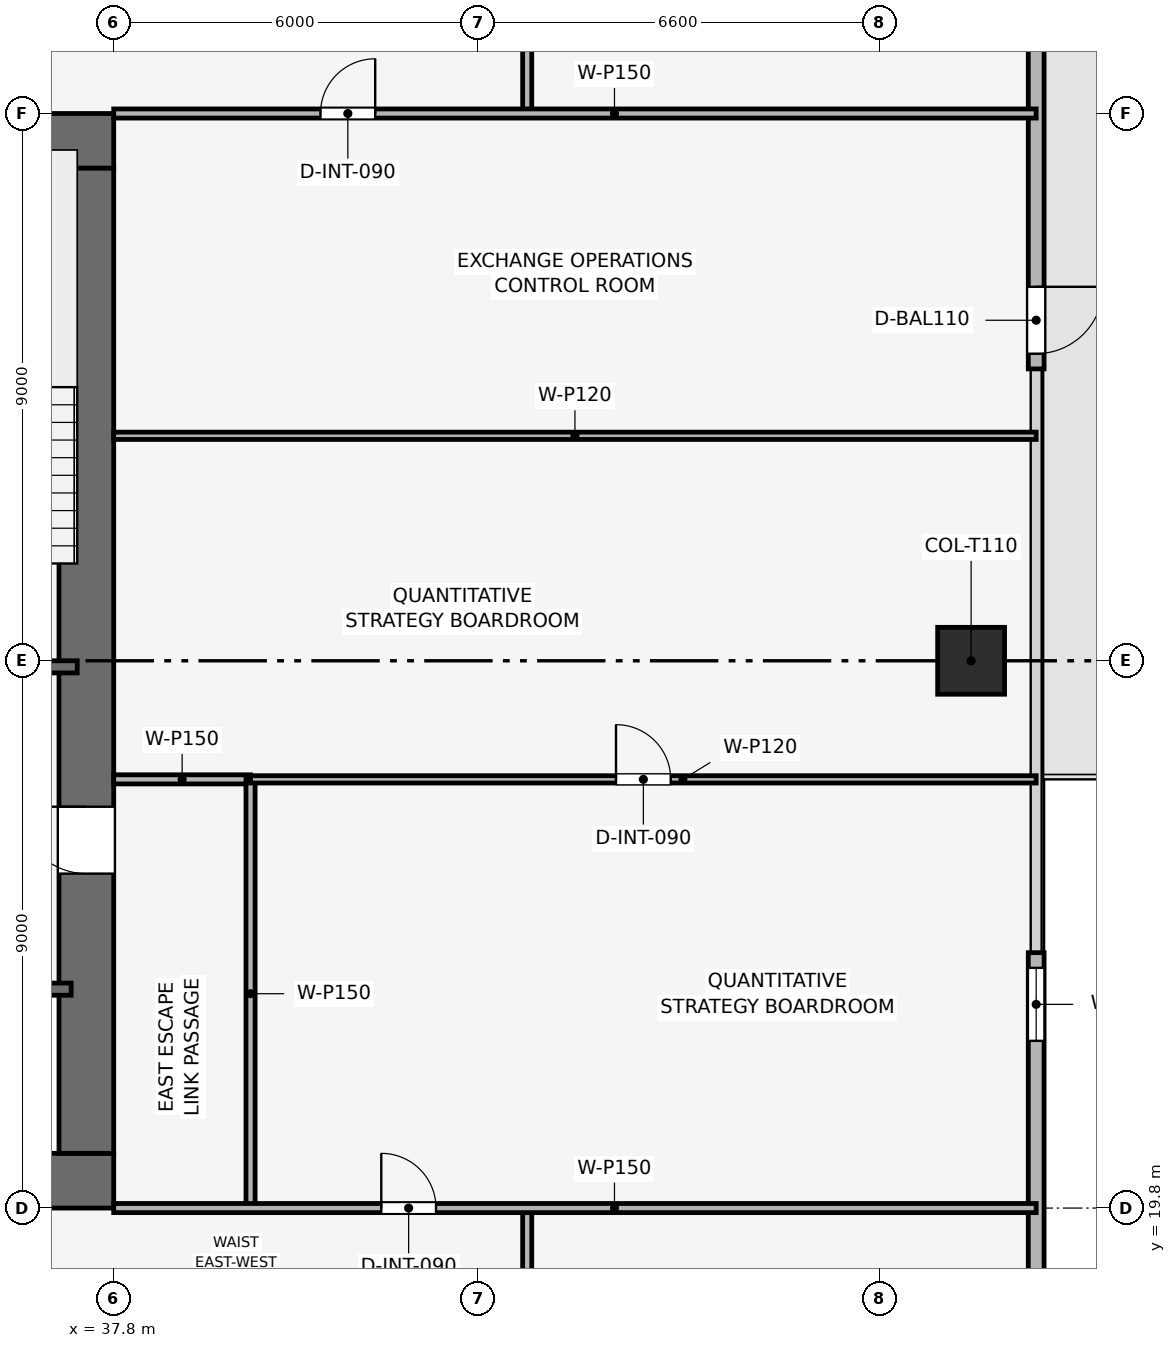
"""IFC4 building model, lengths in metres.
Left out: names, types, materials, properties, quantities, classifications, styles, units other than length and angle.
Written with IfcOpenShell. Run it as: python <this file> out.ifc"""

import sys

from ifc_helpers import new_model, si_unit, direction, frame, frame_2d, origin, origin_2d, place, context, subcontext, project, spatial, rectangle, extrude, element, fill, save


model = new_model("IFC4")
c1 = context("Model", 3, precision=1e-05, world=origin(), true_north=direction((0.0, 1.0)))
c2 = subcontext(c1, "Body", "Model", "MODEL_VIEW")
j1 = project(units=[si_unit("LENGTHUNIT", "METRE"), si_unit("PLANEANGLEUNIT", "RADIAN")], contexts=[c1])
p1 = place(None, origin())
s1 = spatial("IfcSite", under=j1, at=p1, CompositionType="ELEMENT")
p2 = place(p1, origin())
s2 = spatial("IfcBuilding", under=s1, at=p2, CompositionType="ELEMENT")
p3 = place(p2, frame((0.0, 0.0, 179.55)))
s3 = spatial("IfcBuildingStorey", under=s2, at=p3, CompositionType="ELEMENT", Elevation=179.55)
p4 = place(p3, frame((19.8, 20.25, 0.0), z_axis=(0.0, 0.0, 1.0), x_axis=(1.0, 0.0, 0.0)))
e1 = element("IfcWall", 1, at=p4, inside=s3, PredefinedType="SHEAR", context=c2, shape_type="SweptSolid", body=[
    extrude(rectangle(XDim=18.0, YDim=0.9, at=frame_2d((9.0, 0.0))), origin(), (0.0, 0.0, 1.0), 3.75),
])
p5 = place(p4, frame((8.4, 0.0, 0.0)))
e2 = element("IfcOpeningElement", 2, at=p5, cuts=e1, PredefinedType="OPENING", context=c2, shape_type="SweptSolid", body=[
    extrude(rectangle(XDim=1.2, YDim=2.2, at=frame_2d((0.6, 1.1))), frame((0.0, 0.46, 0.0), z_axis=(0.0, -1.0, 0.0), x_axis=(1.0, 0.0, 0.0)), (0.0, 0.0, 1.0), 0.92),
])
p6 = place(p3, frame((19.8, 37.35, 0.0), z_axis=(0.0, 0.0, 1.0), x_axis=(1.0, 0.0, 0.0)))
e3 = element("IfcWall", 3, at=p6, inside=s3, PredefinedType="SHEAR", context=c2, shape_type="SweptSolid", body=[
    extrude(rectangle(XDim=18.0, YDim=0.9, at=frame_2d((9.0, 0.0))), origin(), (0.0, 0.0, 1.0), 3.75),
])
p7 = place(p6, frame((7.05, 0.0, 0.0)))
e4 = element("IfcOpeningElement", 4, at=p7, cuts=e3, PredefinedType="OPENING", context=c2, shape_type="SweptSolid", body=[
    extrude(rectangle(XDim=1.1, YDim=2.15, at=frame_2d((0.55, 1.075))), frame((0.0, 0.46, 0.0), z_axis=(0.0, -1.0, 0.0), x_axis=(1.0, 0.0, 0.0)), (0.0, 0.0, 1.0), 0.92),
])
p8 = place(p3, frame((37.35, 20.7, 0.0), z_axis=(0.0, 0.0, 1.0), x_axis=(0.0, 1.0, 0.0)))
e5 = element("IfcWall", 5, at=p8, inside=s3, PredefinedType="SHEAR", context=c2, shape_type="SweptSolid", body=[
    extrude(rectangle(XDim=16.2, YDim=0.9, at=frame_2d((8.1, 0.0))), origin(), (0.0, 0.0, 1.0), 3.75),
])
p9 = place(p8, frame((4.6, 0.0, 0.0)))
e6 = element("IfcOpeningElement", 6, at=p9, cuts=e5, PredefinedType="OPENING", context=c2, shape_type="SweptSolid", body=[
    extrude(rectangle(XDim=1.1, YDim=2.15, at=frame_2d((0.55, 1.075))), frame((0.0, 0.46, 0.0), z_axis=(0.0, -1.0, 0.0), x_axis=(1.0, 0.0, 0.0)), (0.0, 0.0, 1.0), 0.92),
])
p10 = place(p3, frame((51.9, 28.8, 0.003), z_axis=(0.0, 0.0, 1.0), x_axis=(1.0, 0.0, 0.0)))
e7 = element("IfcColumn", 7, at=p10, inside=s3, PredefinedType="COLUMN", context=c2, shape_type="SweptSolid", body=[
    extrude(rectangle(XDim=1.1, YDim=1.1, at=origin_2d()), origin(), (0.0, 0.0, 1.0), 3.489),
])
p11 = place(p3, frame((52.97, 46.2, 0.0), z_axis=(0.0, 0.0, 1.0), x_axis=(0.0, -1.0, 0.0)))
e8 = element("IfcWall", 8, at=p11, inside=s3, PredefinedType="SOLIDWALL", context=c2, shape_type="SweptSolid", body=[
    extrude(rectangle(XDim=12.6, YDim=0.26, at=frame_2d((6.3, 0.0))), origin(), (0.0, 0.0, 1.0), 3.495),
])
p12 = place(p11, frame((11.25, 0.0, 0.0)))
e9 = element("IfcOpeningElement", 9, at=p12, cuts=e8, PredefinedType="OPENING", context=c2, shape_type="SweptSolid", body=[
    extrude(rectangle(XDim=1.1, YDim=2.2, at=frame_2d((0.55, 1.1))), frame((0.0, 0.14, 0.0), z_axis=(0.0, -1.0, 0.0), x_axis=(1.0, 0.0, 0.0)), (0.0, 0.0, 1.0), 0.28),
])
p13 = place(p3, frame((52.97, 24.0, 0.0), z_axis=(0.0, 0.0, 1.0), x_axis=(0.0, -1.0, 0.0)))
e10 = element("IfcWall", 10, at=p13, inside=s3, PredefinedType="SOLIDWALL", context=c2, shape_type="SweptSolid", body=[
    extrude(rectangle(XDim=12.6, YDim=0.26, at=frame_2d((6.3, 0.0))), origin(), (0.0, 0.0, 1.0), 3.495),
])
p14 = place(p13, frame((0.25, 0.0, 0.9)))
e11 = element("IfcOpeningElement", 11, at=p14, cuts=e10, PredefinedType="OPENING", context=c2, shape_type="SweptSolid", body=[
    extrude(rectangle(XDim=1.2, YDim=2.1, at=frame_2d((0.6, 1.05))), frame((0.0, 0.14, 0.0), z_axis=(0.0, -1.0, 0.0), x_axis=(1.0, 0.0, 0.0)), (0.0, 0.0, 1.0), 0.28),
])
p15 = place(p3, frame((34.05, 28.7, 0.0), z_axis=(0.0, 0.0, 1.0), x_axis=(1.0, 0.0, 0.0)))
e12 = element("IfcWall", 12, at=p15, inside=s3, PredefinedType="SHEAR", context=c2, shape_type="SweptSolid", body=[
    extrude(rectangle(XDim=3.15, YDim=0.2, at=frame_2d((1.575, 0.0))), origin(), (0.0, 0.0, 1.0), 3.495),
])
p16 = place(p15, frame((0.8, 0.0, 0.0)))
e13 = element("IfcOpeningElement", 13, at=p16, cuts=e12, PredefinedType="OPENING", context=c2, shape_type="SweptSolid", body=[
    extrude(rectangle(XDim=1.0, YDim=2.1, at=frame_2d((0.5, 1.05))), frame((0.0, 0.11, 0.0), z_axis=(0.0, -1.0, 0.0), x_axis=(1.0, 0.0, 0.0)), (0.0, 0.0, 1.0), 0.22),
])
p17 = place(p3, frame((34.05, 23.4, 0.0), z_axis=(0.0, 0.0, 1.0), x_axis=(1.0, 0.0, 0.0)))
e14 = element("IfcWall", 14, at=p17, inside=s3, PredefinedType="SHEAR", context=c2, shape_type="SweptSolid", body=[
    extrude(rectangle(XDim=3.05, YDim=0.2, at=frame_2d((1.525, 0.0))), origin(), (0.0, 0.0, 1.0), 3.495),
])
p18 = place(p17, frame((1.2, 0.0, 0.0)))
e15 = element("IfcOpeningElement", 15, at=p18, cuts=e14, PredefinedType="OPENING", context=c2, shape_type="SweptSolid", body=[
    extrude(rectangle(XDim=1.1, YDim=2.15, at=frame_2d((0.55, 1.075))), frame((0.0, 0.11, 0.0), z_axis=(0.0, -1.0, 0.0), x_axis=(1.0, 0.0, 0.0)), (0.0, 0.0, 1.0), 0.22),
])
p19 = place(p3, frame((37.8, 26.85, 0.0), z_axis=(0.0, 0.0, 1.0), x_axis=(1.0, 0.0, 0.0)))
e16 = element("IfcWall", 16, at=p19, inside=s3, PredefinedType="PARTITIONING", context=c2, shape_type="SweptSolid", body=[
    extrude(rectangle(XDim=2.25, YDim=0.15, at=frame_2d((1.125, 0.0))), origin(), (0.0, 0.0, 1.0), 3.495),
])
p20 = place(p3, frame((40.05, 19.8, 0.0), z_axis=(0.0, 0.0, 1.0), x_axis=(0.0, 1.0, 0.0)))
e17 = element("IfcWall", 17, at=p20, inside=s3, PredefinedType="PARTITIONING", context=c2, shape_type="SweptSolid", body=[
    extrude(rectangle(XDim=7.05, YDim=0.15, at=frame_2d((3.525, 0.0))), origin(), (0.0, 0.0, 1.0), 3.03),
])
p21 = place(p3, frame((40.05, 26.85, 0.0), z_axis=(0.0, 0.0, 1.0), x_axis=(1.0, 0.0, 0.0)))
e18 = element("IfcWall", 18, at=p21, inside=s3, PredefinedType="PARTITIONING", context=c2, shape_type="SweptSolid", body=[
    extrude(rectangle(XDim=12.92, YDim=0.12, at=frame_2d((6.46, 0.0))), origin(), (0.0, 0.0, 1.0), 2.98),
])
p22 = place(p21, frame((6.01, 0.0, 0.0)))
e19 = element("IfcOpeningElement", 19, at=p22, cuts=e18, PredefinedType="OPENING", context=c2, shape_type="SweptSolid", body=[
    extrude(rectangle(XDim=0.9, YDim=2.1, at=frame_2d((0.45, 1.05))), frame((0.0, 0.07, 0.0), z_axis=(0.0, -1.0, 0.0), x_axis=(1.0, 0.0, 0.0)), (0.0, 0.0, 1.0), 0.14),
])
p23 = place(p3, frame((37.8, 32.5, 0.0), z_axis=(0.0, 0.0, 1.0), x_axis=(1.0, 0.0, 0.0)))
e20 = element("IfcWall", 20, at=p23, inside=s3, PredefinedType="PARTITIONING", context=c2, shape_type="SweptSolid", body=[
    extrude(rectangle(XDim=15.17, YDim=0.12, at=frame_2d((7.585, 0.0))), origin(), (0.0, 0.0, 1.0), 2.98),
])
p24 = place(p3, frame((44.6, 17.4, 0.0), z_axis=(0.0, 0.0, 1.0), x_axis=(0.0, 1.0, 0.0)))
e21 = element("IfcWall", 21, at=p24, inside=s3, PredefinedType="PARTITIONING", context=c2, shape_type="SweptSolid", body=[
    extrude(rectangle(XDim=2.4, YDim=0.15, at=frame_2d((1.2, 0.0))), origin(), (0.0, 0.0, 1.0), 3.495),
])
p25 = place(p3, frame((44.6, 37.8, 0.0), z_axis=(0.0, 0.0, 1.0), x_axis=(0.0, 1.0, 0.0)))
e22 = element("IfcWall", 22, at=p25, inside=s3, PredefinedType="PARTITIONING", context=c2, shape_type="SweptSolid", body=[
    extrude(rectangle(XDim=2.4, YDim=0.15, at=frame_2d((1.2, 0.0))), origin(), (0.0, 0.0, 1.0), 3.495),
])
p26 = place(p3, frame((37.8, 19.8, 0.0), z_axis=(0.0, 0.0, 1.0), x_axis=(1.0, 0.0, 0.0)))
e23 = element("IfcWall", 23, at=p26, inside=s3, PredefinedType="PARTITIONING", context=c2, shape_type="SweptSolid", body=[
    extrude(rectangle(XDim=15.17, YDim=0.15, at=frame_2d((7.585, 0.0))), origin(), (0.0, 0.0, 1.0), 2.98),
])
p27 = place(p26, frame((4.4, 0.0, 0.0)))
e24 = element("IfcOpeningElement", 24, at=p27, cuts=e23, PredefinedType="OPENING", context=c2, shape_type="SweptSolid", body=[
    extrude(rectangle(XDim=0.9, YDim=2.1, at=frame_2d((0.45, 1.05))), frame((0.0, 0.085, 0.0), z_axis=(0.0, -1.0, 0.0), x_axis=(1.0, 0.0, 0.0)), (0.0, 0.0, 1.0), 0.17),
])
p28 = place(p3, frame((37.8, 37.8, 0.0), z_axis=(0.0, 0.0, 1.0), x_axis=(1.0, 0.0, 0.0)))
e25 = element("IfcWall", 25, at=p28, inside=s3, PredefinedType="PARTITIONING", context=c2, shape_type="SweptSolid", body=[
    extrude(rectangle(XDim=15.17, YDim=0.15, at=frame_2d((7.585, 0.0))), origin(), (0.0, 0.0, 1.0), 2.98),
])
p29 = place(p28, frame((3.4, 0.0, 0.0)))
e26 = element("IfcOpeningElement", 26, at=p29, cuts=e25, PredefinedType="OPENING", context=c2, shape_type="SweptSolid", body=[
    extrude(rectangle(XDim=0.9, YDim=2.1, at=frame_2d((0.45, 1.05))), frame((0.0, 0.085, 0.0), z_axis=(0.0, -1.0, 0.0), x_axis=(1.0, 0.0, 0.0)), (0.0, 0.0, 1.0), 0.17),
])
p30 = place(p12, origin())
e27 = element("IfcDoor", 27, at=p30, inside=s3, OperationType="SINGLE_SWING_LEFT", PredefinedType="DOOR", context=c2, shape_type="SweptSolid", body=[
    extrude(rectangle(XDim=1.1, YDim=2.2, at=frame_2d((0.55, 1.1))), frame((0.0, 0.025, 0.0), z_axis=(0.0, -1.0, 0.0), x_axis=(1.0, 0.0, 0.0)), (0.0, 0.0, 1.0), 0.05),
])
fill(e9, e27)
p31 = place(p14, origin())
e28 = element("IfcWindow", 28, at=p31, inside=s3, PartitioningType="SINGLE_PANEL", PredefinedType="WINDOW", context=c2, shape_type="SweptSolid", body=[
    extrude(rectangle(XDim=1.2, YDim=2.1, at=frame_2d((0.6, 1.05))), frame((0.0, 0.03, 0.0), z_axis=(0.0, -1.0, 0.0), x_axis=(1.0, 0.0, 0.0)), (0.0, 0.0, 1.0), 0.06),
])
fill(e11, e28)
p32 = place(p22, origin())
e29 = element("IfcDoor", 29, at=p32, inside=s3, OperationType="SINGLE_SWING_LEFT", PredefinedType="DOOR", context=c2, shape_type="SweptSolid", body=[
    extrude(rectangle(XDim=0.9, YDim=2.1, at=frame_2d((0.45, 1.05))), frame((0.0, 0.025, 0.0), z_axis=(0.0, -1.0, 0.0), x_axis=(1.0, 0.0, 0.0)), (0.0, 0.0, 1.0), 0.05),
])
fill(e19, e29)
p33 = place(p27, origin())
e30 = element("IfcDoor", 30, at=p33, inside=s3, OperationType="SINGLE_SWING_LEFT", PredefinedType="DOOR", context=c2, shape_type="SweptSolid", body=[
    extrude(rectangle(XDim=0.9, YDim=2.1, at=frame_2d((0.45, 1.05))), frame((0.0, 0.025, 0.0), z_axis=(0.0, -1.0, 0.0), x_axis=(1.0, 0.0, 0.0)), (0.0, 0.0, 1.0), 0.05),
])
fill(e24, e30)
p34 = place(p29, origin())
e31 = element("IfcDoor", 31, at=p34, inside=s3, OperationType="SINGLE_SWING_RIGHT", PredefinedType="DOOR", context=c2, shape_type="SweptSolid", body=[
    extrude(rectangle(XDim=0.9, YDim=2.1, at=frame_2d((0.45, 1.05))), frame((0.0, 0.025, 0.0), z_axis=(0.0, -1.0, 0.0), x_axis=(1.0, 0.0, 0.0)), (0.0, 0.0, 1.0), 0.05),
])
fill(e26, e31)
p35 = place(p9, origin())
e32 = element("IfcDoor", 32, at=p35, inside=s3, OperationType="SINGLE_SWING_RIGHT", PredefinedType="DOOR", context=c2, shape_type="SweptSolid", body=[
    extrude(rectangle(XDim=1.1, YDim=2.15, at=frame_2d((0.55, 1.075))), frame((0.0, 0.025, 0.0), z_axis=(0.0, -1.0, 0.0), x_axis=(1.0, 0.0, 0.0)), (0.0, 0.0, 1.0), 0.05),
])
fill(e6, e32)
save(model, sys.argv[1])
